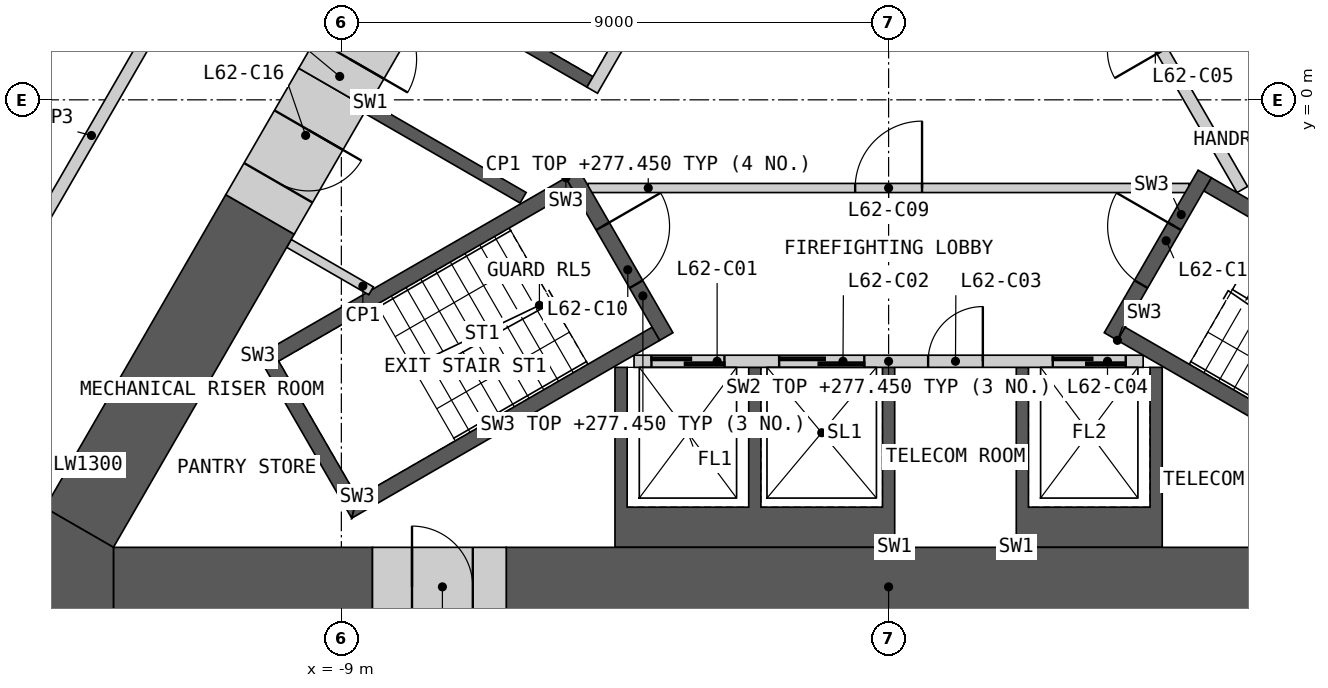
"""IFC4 building model, lengths in metres.
Left out: names, types, materials, properties, quantities, classifications, styles, units other than length and angle.
Written with IfcOpenShell. Run it as: python <this file> out.ifc"""

import sys

from ifc_helpers import new_model, si_unit, direction, frame, frame_2d, origin, place, context, subcontext, project, spatial, polyline, rectangle, outline, extrude, element, fill, save


model = new_model("IFC4")
c1 = context("Model", 3, precision=1e-05, world=origin(), true_north=direction((0.0, 1.0)))
c2 = subcontext(c1, "Body", "Model", "MODEL_VIEW")
j1 = project(units=[si_unit("LENGTHUNIT", "METRE"), si_unit("PLANEANGLEUNIT", "RADIAN")], contexts=[c1])
p1 = place(None, origin())
s1 = spatial("IfcSite", under=j1, at=p1, CompositionType="ELEMENT")
p2 = place(p1, origin())
s2 = spatial("IfcBuilding", under=s1, at=p2, CompositionType="ELEMENT")
p3 = place(p2, frame((0.0, 0.0, 274.2)))
s3 = spatial("IfcBuildingStorey", under=s2, at=p3, CompositionType="ELEMENT", Elevation=274.2)
p4 = place(p3, origin())
e1 = element("IfcWall", 1, at=p4, inside=s3, PredefinedType="SHEAR", context=c2, shape_type="SweptSolid", body=[
    extrude(outline(polyline([(0.1, -7.36), (-4.5, -7.36), (-4.5, -4.4), (-4.3, -4.4), (-4.3, -6.7), (-2.3, -6.7), (-2.3, -4.4), (-2.1, -4.4), (-2.1, -6.7), (-0.1, -6.7), (-0.1, -4.4), (0.1, -4.4), (0.1, -7.36)])), origin(), (0.0, 0.0, 1.0), 3.25),
])
p5 = place(p3, origin())
e2 = element("IfcWall", 2, at=p5, inside=s3, PredefinedType="SHEAR", context=c2, shape_type="SweptSolid", body=[
    extrude(outline(polyline([(2.1, -7.36), (2.1, -4.4), (2.3, -4.4), (2.3, -6.7), (4.3, -6.7), (4.3, -4.4), (4.5, -4.4), (4.5, -7.36), (2.1, -7.36)])), origin(), (0.0, 0.0, 1.0), 3.25),
])
p6 = place(p3, frame((-4.187, -4.3, 0.0), z_axis=(0.0, 0.0, 1.0), x_axis=(1.0, 0.0, 0.0)))
e3 = element("IfcWall", 3, at=p6, inside=s3, PredefinedType="SOLIDWALL", context=c2, shape_type="SweptSolid", body=[
    extrude(rectangle(XDim=8.373, YDim=0.2, at=frame_2d((4.187, 0.0))), origin(), (0.0, 0.0, 1.0), 3.25),
])
p7 = place(p6, frame((0.287, 0.0, 0.0)))
e4 = element("IfcOpeningElement", 4, at=p7, cuts=e3, PredefinedType="OPENING", context=c2, shape_type="SweptSolid", body=[
    extrude(rectangle(XDim=1.2, YDim=2.1, at=frame_2d((0.6, 1.05))), frame((0.0, 0.11, 0.0), z_axis=(0.0, -1.0, 0.0), x_axis=(1.0, 0.0, 0.0)), (0.0, 0.0, 1.0), 0.22),
])
p8 = place(p6, frame((2.387, 0.0, 0.0)))
e5 = element("IfcOpeningElement", 5, at=p8, cuts=e3, PredefinedType="OPENING", context=c2, shape_type="SweptSolid", body=[
    extrude(rectangle(XDim=1.4, YDim=2.1, at=frame_2d((0.7, 1.05))), frame((0.0, 0.11, 0.0), z_axis=(0.0, -1.0, 0.0), x_axis=(1.0, 0.0, 0.0)), (0.0, 0.0, 1.0), 0.22),
])
p9 = place(p6, frame((4.837, 0.0, 0.0)))
e6 = element("IfcOpeningElement", 6, at=p9, cuts=e3, PredefinedType="OPENING", context=c2, shape_type="SweptSolid", body=[
    extrude(rectangle(XDim=0.9, YDim=2.1, at=frame_2d((0.45, 1.05))), frame((0.0, 0.11, 0.0), z_axis=(0.0, -1.0, 0.0), x_axis=(1.0, 0.0, 0.0)), (0.0, 0.0, 1.0), 0.22),
])
p10 = place(p6, frame((6.887, 0.0, 0.0)))
e7 = element("IfcOpeningElement", 7, at=p10, cuts=e3, PredefinedType="OPENING", context=c2, shape_type="SweptSolid", body=[
    extrude(rectangle(XDim=1.2, YDim=2.1, at=frame_2d((0.6, 1.05))), frame((0.0, 0.11, 0.0), z_axis=(0.0, -1.0, 0.0), x_axis=(1.0, 0.0, 0.0)), (0.0, 0.0, 1.0), 0.22),
])
p11 = place(p3, origin())
e8 = element("IfcWall", 8, at=p11, inside=s3, PredefinedType="SHEAR", context=c2, shape_type="SweptSolid", body=[
    extrude(outline(polyline([(4.124, 7.577), (8.624, -0.217), (8.231, -0.444), (6.061, -1.697), (5.96, -1.524), (7.952, -0.374), (4.752, 5.169), (2.76, 4.019), (2.66, 4.192), (4.652, 5.342), (3.652, 7.074), (1.66, 5.924), (1.561, 6.097), (3.731, 7.35), (4.124, 7.577)])), origin(), (0.0, 0.0, 1.0), 3.25),
])
p12 = place(p3, frame((5.817, -1.476, 0.0), z_axis=(0.0, 0.0, 1.0), x_axis=(-0.500002616675, 0.866023893041, 0.0)))
e9 = element("IfcWall", 9, at=p12, inside=s3, PredefinedType="SOLIDWALL", context=c2, shape_type="SweptSolid", body=[
    extrude(rectangle(XDim=8.373, YDim=0.2, at=frame_2d((4.187, 0.0))), origin(), (0.0, 0.0, 1.0), 3.25),
])
p13 = place(p12, frame((2.637, 0.0, 0.0)))
e10 = element("IfcOpeningElement", 10, at=p13, cuts=e9, PredefinedType="OPENING", context=c2, shape_type="SweptSolid", body=[
    extrude(rectangle(XDim=0.9, YDim=2.1, at=frame_2d((0.45, 1.05))), frame((0.0, 0.11, 0.0), z_axis=(0.0, -1.0, 0.0), x_axis=(1.0, 0.0, 0.0)), (0.0, 0.0, 1.0), 0.22),
])
p14 = place(p12, frame((6.937, 0.0, 0.0)))
e11 = element("IfcOpeningElement", 11, at=p14, cuts=e9, PredefinedType="OPENING", context=c2, shape_type="SweptSolid", body=[
    extrude(rectangle(XDim=1.1, YDim=2.1, at=frame_2d((0.55, 1.05))), frame((0.0, 0.11, 0.0), z_axis=(0.0, -1.0, 0.0), x_axis=(1.0, 0.0, 0.0)), (0.0, 0.0, 1.0), 0.22),
])
p15 = place(p3, origin())
e12 = element("IfcWall", 12, at=p15, inside=s3, PredefinedType="SHEAR", context=c2, shape_type="SweptSolid", body=[
    extrude(outline(polyline([(-7.524, 1.688), (-4.124, 7.577), (-3.731, 7.35), (-1.561, 6.097), (-1.66, 5.924), (-3.652, 7.074), (-4.652, 5.342), (-2.66, 4.192), (-2.76, 4.019), (-4.752, 5.169), (-5.752, 3.437), (-3.76, 2.287), (-3.861, 2.113), (-5.852, 3.263), (-6.852, 1.531), (-4.861, 0.381), (-4.96, 0.208), (-7.131, 1.461), (-7.524, 1.688)])), origin(), (0.0, 0.0, 1.0), 3.25),
])
p16 = place(p3, origin())
e13 = element("IfcWall", 13, at=p16, inside=s3, PredefinedType="SHEAR", context=c2, shape_type="SweptSolid", body=[
    extrude(outline(polyline([(-8.524, -0.044), (-8.131, -0.271), (-5.96, -1.524), (-6.061, -1.697), (-8.231, -0.444), (-8.624, -0.217), (-8.524, -0.044)])), origin(), (0.0, 0.0, 1.0), 3.25),
])
p17 = place(p3, frame((-1.631, 5.776, 0.0), z_axis=(0.0, 0.0, 1.0), x_axis=(-0.499992876559, -0.866029516466, 0.0)))
e14 = element("IfcWall", 14, at=p17, inside=s3, PredefinedType="SOLIDWALL", context=c2, shape_type="SweptSolid", body=[
    extrude(rectangle(XDim=6.486, YDim=0.2, at=frame_2d((3.243, 0.0))), origin(), (0.0, 0.0, 1.0), 3.25),
])
p18 = place(p17, frame((0.337, 0.0, 0.0)))
e15 = element("IfcOpeningElement", 15, at=p18, cuts=e14, PredefinedType="OPENING", context=c2, shape_type="SweptSolid", body=[
    extrude(rectangle(XDim=1.1, YDim=2.1, at=frame_2d((0.55, 1.05))), frame((0.0, 0.11, 0.0), z_axis=(0.0, -1.0, 0.0), x_axis=(1.0, 0.0, 0.0)), (0.0, 0.0, 1.0), 0.22),
])
p19 = place(p17, frame((2.537, 0.0, 0.0)))
e16 = element("IfcOpeningElement", 16, at=p19, cuts=e14, PredefinedType="OPENING", context=c2, shape_type="SweptSolid", body=[
    extrude(rectangle(XDim=1.1, YDim=2.1, at=frame_2d((0.55, 1.05))), frame((0.0, 0.11, 0.0), z_axis=(0.0, -1.0, 0.0), x_axis=(1.0, 0.0, 0.0)), (0.0, 0.0, 1.0), 0.22),
])
p20 = place(p3, frame((-4.941, -1.45, 0.0), z_axis=(0.0, 0.0, 1.0), x_axis=(1.0, 0.0, 0.0)))
e17 = element("IfcWall", 17, at=p20, inside=s3, PredefinedType="PARTITIONING", context=c2, shape_type="SweptSolid", body=[
    extrude(rectangle(XDim=9.882, YDim=0.15, at=frame_2d((4.941, 0.0))), origin(), (0.0, 0.0, 1.0), 3.25),
])
p21 = place(p20, frame((4.391, 0.0, 0.0)))
e18 = element("IfcOpeningElement", 18, at=p21, cuts=e17, PredefinedType="OPENING", context=c2, shape_type="SweptSolid", body=[
    extrude(rectangle(XDim=1.1, YDim=2.1, at=frame_2d((0.55, 1.05))), frame((0.0, 0.085, 0.0), z_axis=(0.0, -1.0, 0.0), x_axis=(1.0, 0.0, 0.0)), (0.0, 0.0, 1.0), 0.17),
])
p22 = place(p3, origin())
e19 = element("IfcWall", 19, at=p22, inside=s3, PredefinedType="SHEAR", context=c2, shape_type="SweptSolid", body=[
    extrude(outline(polyline([(-5.307, -1.281), (-10.374, -4.206), (-10.032, -4.298), (-5.182, -1.498), (-5.307, -1.281)])), origin(), (0.0, 0.0, 1.0), 3.25),
])
p23 = place(p3, origin())
e20 = element("IfcWall", 20, at=p23, inside=s3, PredefinedType="SHEAR", context=c2, shape_type="SweptSolid", body=[
    extrude(outline(polyline([(-10.374, -4.206), (-8.83, -6.881), (-8.738, -6.539), (-10.032, -4.298), (-10.374, -4.206)])), origin(), (0.0, 0.0, 1.0), 3.25),
])
p24 = place(p3, origin())
e21 = element("IfcWall", 21, at=p24, inside=s3, PredefinedType="SHEAR", context=c2, shape_type="SweptSolid", body=[
    extrude(outline(polyline([(-8.738, -6.539), (-8.83, -6.881), (-3.763, -3.956), (-3.888, -3.739), (-8.738, -6.539)])), origin(), (0.0, 0.0, 1.0), 3.25),
])
p25 = place(p3, frame((-5.199, -1.219, 0.0), z_axis=(0.0, 0.0, 1.0), x_axis=(0.499982516597, -0.866035497597, 0.0)))
e22 = element("IfcWall", 22, at=p25, inside=s3, PredefinedType="SHEAR", context=c2, shape_type="SweptSolid", body=[
    extrude(rectangle(XDim=3.088, YDim=0.25, at=frame_2d((1.544, 0.0))), origin(), (0.0, 0.0, 1.0), 3.25),
])
p26 = place(p25, frame((0.994, 0.0, 0.0)))
e23 = element("IfcOpeningElement", 23, at=p26, cuts=e22, PredefinedType="OPENING", context=c2, shape_type="SweptSolid", body=[
    extrude(rectangle(XDim=1.1, YDim=2.1, at=frame_2d((0.55, 1.05))), frame((0.0, 0.135, 0.0), z_axis=(0.0, -1.0, 0.0), x_axis=(1.0, 0.0, 0.0)), (0.0, 0.0, 1.0), 0.27),
])
p27 = place(p3, origin())
e24 = element("IfcWall", 24, at=p27, inside=s3, PredefinedType="SHEAR", context=c2, shape_type="SweptSolid", body=[
    extrude(outline(polyline([(3.763, -3.956), (8.83, -6.881), (8.738, -6.539), (3.888, -3.739), (3.763, -3.956)])), origin(), (0.0, 0.0, 1.0), 3.25),
])
p28 = place(p3, origin())
e25 = element("IfcWall", 25, at=p28, inside=s3, PredefinedType="SHEAR", context=c2, shape_type="SweptSolid", body=[
    extrude(outline(polyline([(10.032, -4.298), (10.374, -4.206), (5.307, -1.281), (5.182, -1.498), (10.032, -4.298)])), origin(), (0.0, 0.0, 1.0), 3.25),
])
p29 = place(p3, frame((3.655, -3.893, 0.0), z_axis=(0.0, 0.0, 1.0), x_axis=(0.499982516597, 0.866035497597, 0.0)))
e26 = element("IfcWall", 26, at=p29, inside=s3, PredefinedType="SHEAR", context=c2, shape_type="SweptSolid", body=[
    extrude(rectangle(XDim=3.088, YDim=0.25, at=frame_2d((1.544, 0.0))), origin(), (0.0, 0.0, 1.0), 3.25),
])
p30 = place(p29, frame((0.994, 0.0, 0.0)))
e27 = element("IfcOpeningElement", 27, at=p30, cuts=e26, PredefinedType="OPENING", context=c2, shape_type="SweptSolid", body=[
    extrude(rectangle(XDim=1.1, YDim=2.1, at=frame_2d((0.55, 1.05))), frame((0.0, 0.135, 0.0), z_axis=(0.0, -1.0, 0.0), x_axis=(1.0, 0.0, 0.0)), (0.0, 0.0, 1.0), 0.27),
])
p31 = place(p3, frame((-9.862, -2.361, 0.0), z_axis=(0.0, 0.0, 1.0), x_axis=(0.865990094875, -0.500061151839, 0.0)))
e28 = element("IfcWall", 28, at=p31, inside=s3, PredefinedType="PARTITIONING", context=c2, shape_type="SweptSolid", body=[
    extrude(rectangle(XDim=1.56, YDim=0.15, at=frame_2d((0.78, 0.0))), origin(), (0.0, 0.0, 1.0), 3.25),
])
p32 = place(p3, frame((-6.288, -8.01, 0.0), z_axis=(0.0, 0.0, 1.0), x_axis=(1.0, 0.0, 0.0)))
e29 = element("IfcWall", 29, at=p32, inside=s3, PredefinedType="SHEAR", context=c2, shape_type="SweptSolid", body=[
    extrude(rectangle(XDim=12.576, YDim=1.3, at=frame_2d((6.288, 0.0))), origin(), (0.0, 0.0, 1.0), 3.25),
])
p33 = place(p3, frame((-12.748, -8.01, 0.0), z_axis=(0.0, 0.0, 1.0), x_axis=(1.0, 0.0, 0.0)))
e30 = element("IfcWall", 30, at=p33, inside=s3, PredefinedType="SHEAR", context=c2, shape_type="SweptSolid", body=[
    extrude(rectangle(XDim=4.26, YDim=1.3, at=frame_2d((2.13, 0.0))), origin(), (0.0, 0.0, 1.0), 3.25),
])
p34 = place(p3, frame((10.062, -1.408, 0.0), z_axis=(0.0, 0.0, 1.0), x_axis=(-0.500000545805, 0.866025088663, 0.0)))
e31 = element("IfcWall", 31, at=p34, inside=s3, PredefinedType="SHEAR", context=c2, shape_type="SweptSolid", body=[
    extrude(rectangle(XDim=12.539, YDim=1.3, at=frame_2d((6.27, 0.0))), origin(), (0.0, 0.0, 1.0), 3.25),
])
p35 = place(p3, frame((-10.338, -1.885, 0.0), z_axis=(0.0, 0.0, 1.0), x_axis=(-0.499975944838, -0.866039291593, 0.0)))
e32 = element("IfcWall", 32, at=p35, inside=s3, PredefinedType="SHEAR", context=c2, shape_type="SweptSolid", body=[
    extrude(rectangle(XDim=5.947, YDim=1.3, at=frame_2d((2.974, 0.0))), origin(), (0.0, 0.0, 1.0), 3.25),
])
p36 = place(p3, origin())
e33 = element("IfcWall", 33, at=p36, inside=s3, PredefinedType="SHEAR", context=c2, shape_type="SweptSolid", body=[
    extrude(outline(polyline([(-13.874, -6.71), (-12.748, -7.36), (-12.748, -8.66), (-15.0, -8.66), (-13.874, -6.71)])), origin(), (0.0, 0.0, 1.0), 3.25),
])
p37 = place(p3, frame((-8.488, -8.01, 0.0), z_axis=(0.0, 0.0, 1.0), x_axis=(1.0, 0.0, 0.0)))
e34 = element("IfcWall", 34, at=p37, inside=s3, PredefinedType="SHEAR", context=c2, shape_type="SweptSolid", body=[
    extrude(rectangle(XDim=2.2, YDim=1.3, at=frame_2d((1.1, 0.0))), origin(), (0.0, 0.0, 1.0), 3.25),
])
p38 = place(p37, frame((0.65, 0.0, 0.0)))
e35 = element("IfcOpeningElement", 35, at=p38, cuts=e34, PredefinedType="OPENING", context=c2, shape_type="SweptSolid", body=[
    extrude(rectangle(XDim=1.0, YDim=2.1, at=frame_2d((0.5, 1.05))), frame((0.0, 0.66, 0.0), z_axis=(0.0, -1.0, 0.0), x_axis=(1.0, 0.0, 0.0)), (0.0, 0.0, 1.0), 1.32),
])
p39 = place(p3, frame((-9.137, 0.195, 0.0), z_axis=(0.0, 0.0, 1.0), x_axis=(-0.500009943768, -0.866019662671, 0.0)))
e36 = element("IfcWall", 36, at=p39, inside=s3, PredefinedType="SHEAR", context=c2, shape_type="SweptSolid", body=[
    extrude(rectangle(XDim=2.401, YDim=1.3, at=frame_2d((1.201, 0.0))), origin(), (0.0, 0.0, 1.0), 3.25),
])
p40 = place(p39, frame((0.8, 0.0, 0.0)))
e37 = element("IfcOpeningElement", 37, at=p40, cuts=e36, PredefinedType="OPENING", context=c2, shape_type="SweptSolid", body=[
    extrude(rectangle(XDim=1.0, YDim=2.1, at=frame_2d((0.5, 1.05))), frame((0.0, 0.66, 0.0), z_axis=(0.0, -1.0, 0.0), x_axis=(1.0, 0.0, 0.0)), (0.0, 0.0, 1.0), 1.32),
])
p41 = place(p3, frame((-8.037, 2.1, 0.0), z_axis=(0.0, 0.0, 1.0), x_axis=(-0.50002983664, -0.866008176907, 0.0)))
e38 = element("IfcWall", 38, at=p41, inside=s3, PredefinedType="SHEAR", context=c2, shape_type="SweptSolid", body=[
    extrude(rectangle(XDim=2.2, YDim=1.3, at=frame_2d((1.1, 0.0))), origin(), (0.0, 0.0, 1.0), 3.25),
])
p42 = place(p41, frame((0.55, 0.0, 0.0)))
e39 = element("IfcOpeningElement", 39, at=p42, cuts=e38, PredefinedType="OPENING", context=c2, shape_type="SweptSolid", body=[
    extrude(rectangle(XDim=1.1, YDim=2.1, at=frame_2d((0.55, 1.05))), frame((0.0, 0.66, 0.0), z_axis=(0.0, -1.0, 0.0), x_axis=(1.0, 0.0, 0.0)), (0.0, 0.0, 1.0), 1.32),
])
p43 = place(p3, frame((-14.247, -2.556, 0.0), z_axis=(0.0, 0.0, 1.0), x_axis=(0.49998193945, 0.866035830797, 0.0)))
e40 = element("IfcWall", 40, at=p43, inside=s3, PredefinedType="PARTITIONING", context=c2, shape_type="SweptSolid", body=[
    extrude(rectangle(XDim=9.094, YDim=0.2, at=frame_2d((4.547, 0.0))), origin(), (0.0, 0.0, 1.0), 3.25),
])
p44 = place(p43, frame((6.833, 0.0, 0.0)))
e41 = element("IfcOpeningElement", 41, at=p44, cuts=e40, PredefinedType="OPENING", context=c2, shape_type="SweptSolid", body=[
    extrude(rectangle(XDim=1.1, YDim=2.1, at=frame_2d((0.55, 1.05))), frame((0.0, 0.11, 0.0), z_axis=(0.0, -1.0, 0.0), x_axis=(1.0, 0.0, 0.0)), (0.0, 0.0, 1.0), 0.22),
])
p45 = place(p7, origin())
e42 = element("IfcDoor", 42, at=p45, inside=s3, OperationType="SLIDING_TO_LEFT", PredefinedType="DOOR", context=c2, shape_type="SweptSolid", body=[
    extrude(rectangle(XDim=1.2, YDim=2.1, at=frame_2d((0.6, 1.05))), frame((0.0, 0.025, 0.0), z_axis=(0.0, -1.0, 0.0), x_axis=(1.0, 0.0, 0.0)), (0.0, 0.0, 1.0), 0.05),
])
fill(e4, e42)
p46 = place(p8, origin())
e43 = element("IfcDoor", 43, at=p46, inside=s3, OperationType="SLIDING_TO_LEFT", PredefinedType="DOOR", context=c2, shape_type="SweptSolid", body=[
    extrude(rectangle(XDim=1.4, YDim=2.1, at=frame_2d((0.7, 1.05))), frame((0.0, 0.025, 0.0), z_axis=(0.0, -1.0, 0.0), x_axis=(1.0, 0.0, 0.0)), (0.0, 0.0, 1.0), 0.05),
])
fill(e5, e43)
p47 = place(p9, origin())
e44 = element("IfcDoor", 44, at=p47, inside=s3, OperationType="SINGLE_SWING_RIGHT", PredefinedType="DOOR", context=c2, shape_type="SweptSolid", body=[
    extrude(rectangle(XDim=0.9, YDim=2.1, at=frame_2d((0.45, 1.05))), frame((0.0, 0.025, 0.0), z_axis=(0.0, -1.0, 0.0), x_axis=(1.0, 0.0, 0.0)), (0.0, 0.0, 1.0), 0.05),
])
fill(e6, e44)
p48 = place(p10, origin())
e45 = element("IfcDoor", 45, at=p48, inside=s3, OperationType="SLIDING_TO_LEFT", PredefinedType="DOOR", context=c2, shape_type="SweptSolid", body=[
    extrude(rectangle(XDim=1.2, YDim=2.1, at=frame_2d((0.6, 1.05))), frame((0.0, 0.025, 0.0), z_axis=(0.0, -1.0, 0.0), x_axis=(1.0, 0.0, 0.0)), (0.0, 0.0, 1.0), 0.05),
])
fill(e7, e45)
p49 = place(p21, origin())
e46 = element("IfcDoor", 46, at=p49, inside=s3, OperationType="SINGLE_SWING_RIGHT", PredefinedType="DOOR", context=c2, shape_type="SweptSolid", body=[
    extrude(rectangle(XDim=1.1, YDim=2.1, at=frame_2d((0.55, 1.05))), frame((0.0, 0.025, 0.0), z_axis=(0.0, -1.0, 0.0), x_axis=(1.0, 0.0, 0.0)), (0.0, 0.0, 1.0), 0.05),
])
fill(e18, e46)
p50 = place(p26, origin())
e47 = element("IfcDoor", 47, at=p50, inside=s3, OperationType="SINGLE_SWING_LEFT", PredefinedType="DOOR", context=c2, shape_type="SweptSolid", body=[
    extrude(rectangle(XDim=1.1, YDim=2.1, at=frame_2d((0.55, 1.05))), frame((0.0, 0.025, 0.0), z_axis=(0.0, -1.0, 0.0), x_axis=(1.0, 0.0, 0.0)), (0.0, 0.0, 1.0), 0.05),
])
fill(e23, e47)
p51 = place(p30, origin())
e48 = element("IfcDoor", 48, at=p51, inside=s3, OperationType="SINGLE_SWING_RIGHT", PredefinedType="DOOR", context=c2, shape_type="SweptSolid", body=[
    extrude(rectangle(XDim=1.1, YDim=2.1, at=frame_2d((0.55, 1.05))), frame((0.0, 0.025, 0.0), z_axis=(0.0, -1.0, 0.0), x_axis=(1.0, 0.0, 0.0)), (0.0, 0.0, 1.0), 0.05),
])
fill(e27, e48)
p52 = place(p38, origin())
e49 = element("IfcDoor", 49, at=p52, inside=s3, OperationType="SINGLE_SWING_LEFT", PredefinedType="DOOR", context=c2, shape_type="SweptSolid", body=[
    extrude(rectangle(XDim=1.0, YDim=2.1, at=frame_2d((0.5, 1.05))), frame((0.0, 0.405, 0.0), z_axis=(0.0, -1.0, 0.0), x_axis=(1.0, 0.0, 0.0)), (0.0, 0.0, 1.0), 0.05),
])
fill(e35, e49)
p53 = place(p40, origin())
e50 = element("IfcDoor", 50, at=p53, inside=s3, OperationType="SINGLE_SWING_LEFT", PredefinedType="DOOR", context=c2, shape_type="SweptSolid", body=[
    extrude(rectangle(XDim=1.0, YDim=2.1, at=frame_2d((0.5, 1.05))), frame((0.0, 0.405, 0.0), z_axis=(0.0, -1.0, 0.0), x_axis=(1.0, 0.0, 0.0)), (0.0, 0.0, 1.0), 0.05),
])
fill(e37, e50)
p54 = place(p42, origin())
e51 = element("IfcDoor", 51, at=p54, inside=s3, OperationType="SINGLE_SWING_RIGHT", PredefinedType="DOOR", context=c2, shape_type="SweptSolid", body=[
    extrude(rectangle(XDim=1.1, YDim=2.1, at=frame_2d((0.55, 1.05))), frame((0.0, 0.405, 0.0), z_axis=(0.0, -1.0, 0.0), x_axis=(1.0, 0.0, 0.0)), (0.0, 0.0, 1.0), 0.05),
])
fill(e39, e51)
save(model, sys.argv[1])
